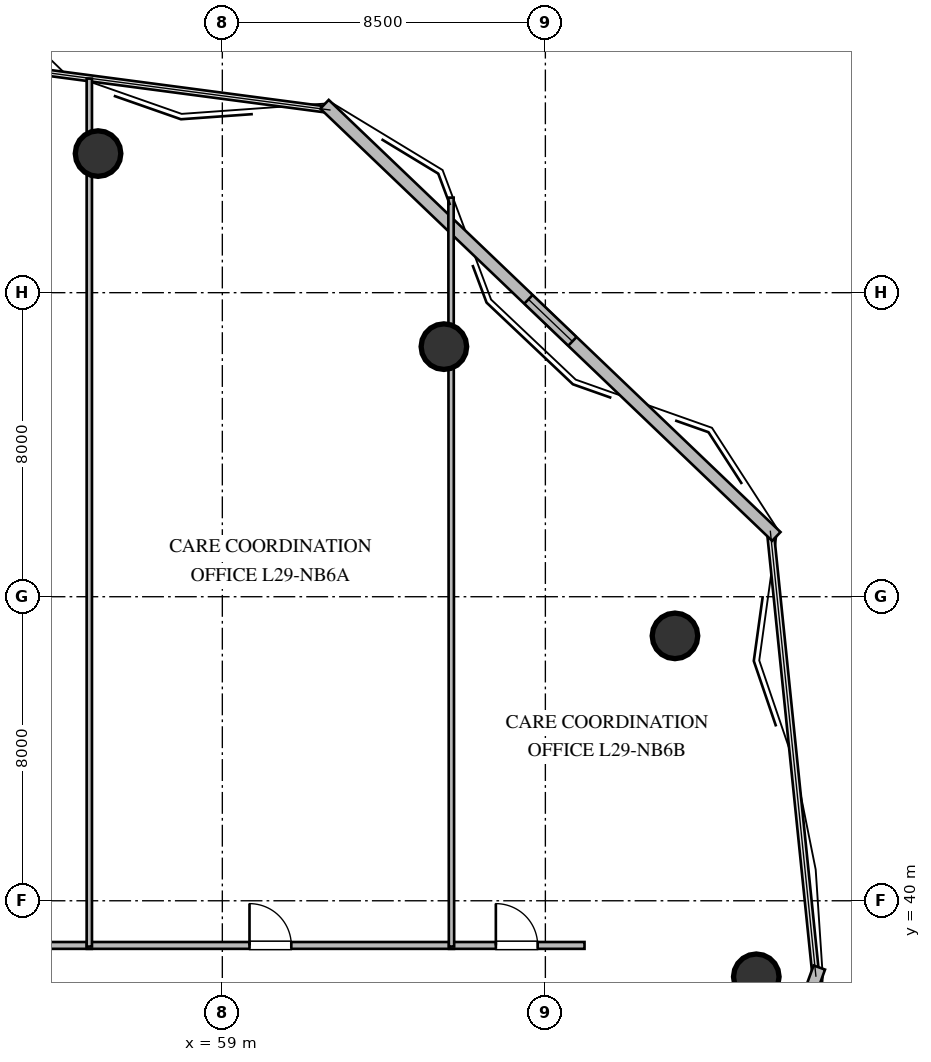
"""IFC4 building model, lengths in metres.
Left out: names, types, materials, properties, quantities, classifications, styles, units other than length and angle.
Written with IfcOpenShell. Run it as: python <this file> out.ifc"""

import sys

from ifc_helpers import new_model, si_unit, direction, frame, frame_2d, origin, origin_2d, place, context, subcontext, project, spatial, rectangle, circle, extrude, element, fill, save


model = new_model("IFC4")
c1 = context("Model", 3, precision=1e-05, world=origin(), true_north=direction((0.0, 1.0)))
c2 = subcontext(c1, "Body", "Model", "MODEL_VIEW")
j1 = project(units=[si_unit("LENGTHUNIT", "METRE"), si_unit("PLANEANGLEUNIT", "RADIAN")], contexts=[c1])
p1 = place(None, origin())
s1 = spatial("IfcSite", under=j1, at=p1, CompositionType="ELEMENT")
p2 = place(p1, origin())
s2 = spatial("IfcBuilding", under=s1, at=p2, CompositionType="ELEMENT")
p3 = place(p2, frame((0.0, 0.0, 113.4)))
s3 = spatial("IfcBuildingStorey", under=s2, at=p3, CompositionType="ELEMENT", Elevation=113.4)
for number, where, z_axis, x_axis in (
    (1, (73.05, 38.0, 0.0), (0.0, 0.0, 1.0), (1.0, 0.0, 0.0)),
    (2, (70.91, 46.97, 0.0), (0.0, 0.0, 1.0), (1.0, 0.0, 0.0)),
    (3, (64.83, 54.58, 0.0), (0.0, 0.0, 1.0), (1.0, 0.0, 0.0)),
    (4, (55.73, 59.66, 0.0), (0.0, 0.0, 1.0), (1.0, 0.0, 0.0)),
):
    element("IfcColumn", number, at=place(p3, frame(where, z_axis=z_axis, x_axis=x_axis)), inside=s3, PredefinedType="COLUMN", context=c2, shape_type="SweptSolid", body=[
        extrude(circle(Radius=0.6, at=origin_2d()), origin(), (0.0, 0.0, 1.0), 3.6),
    ])
p4 = place(p3, frame((74.708, 38.244, 0.0), z_axis=(0.0, 0.0, 1.0), x_axis=(-0.340324669139, -0.94030799187, 0.0)))
e5 = element("IfcWall", 5, at=p4, inside=s3, PredefinedType="STANDARD", context=c2, shape_type="SweptSolid", body=[
    extrude(rectangle(XDim=13.81, YDim=0.32, at=frame_2d((6.905, 0.0))), origin(), (0.0, 0.0, 1.0), 3.36),
])
p5 = place(p3, frame((61.689, 60.957, 0.0), z_axis=(0.0, 0.0, 1.0), x_axis=(0.722641212534, -0.691223319881, 0.0)))
e6 = element("IfcWall", 6, at=p5, inside=s3, PredefinedType="STANDARD", context=c2, shape_type="SweptSolid", body=[
    extrude(rectangle(XDim=16.451, YDim=0.32, at=frame_2d((8.225, 0.0))), origin(), (0.0, 0.0, 1.0), 3.36),
])
p6 = place(p5, frame((7.425, 0.0, 1.05)))
e7 = element("IfcOpeningElement", 7, at=p6, cuts=e6, PredefinedType="OPENING", context=c2, shape_type="SweptSolid", body=[
    extrude(rectangle(XDim=1.6, YDim=1.5, at=frame_2d((0.8, 0.75))), frame((0.0, 0.17, 0.0), z_axis=(0.0, -1.0, 0.0), x_axis=(1.0, 0.0, 0.0)), (0.0, 0.0, 1.0), 0.34),
])
p7 = place(p3, frame((50.935, 38.825, 0.0), z_axis=(0.0, 0.0, 1.0), x_axis=(1.0, 0.0, 0.0)))
e8 = element("IfcWall", 8, at=p7, inside=s3, PredefinedType="PARTITIONING", context=c2, shape_type="SweptSolid", body=[
    extrude(rectangle(XDim=4.63, YDim=0.18, at=frame_2d((2.315, 0.0))), origin(), (0.0, 0.0, 1.0), 3.36),
])
p8 = place(p7, frame((1.765, 0.0, 0.0)))
e9 = element("IfcOpeningElement", 9, at=p8, cuts=e8, PredefinedType="OPENING", context=c2, shape_type="SweptSolid", body=[
    extrude(rectangle(XDim=1.1, YDim=2.1, at=frame_2d((0.55, 1.05))), frame((0.0, 0.1, 0.0), z_axis=(0.0, -1.0, 0.0), x_axis=(1.0, 0.0, 0.0)), (0.0, 0.0, 1.0), 0.2),
])
p9 = place(p3, frame((55.435, 38.825, 0.0), z_axis=(0.0, 0.0, 1.0), x_axis=(1.0, 0.0, 0.0)))
e10 = element("IfcWall", 10, at=p9, inside=s3, PredefinedType="PARTITIONING", context=c2, shape_type="SweptSolid", body=[
    extrude(rectangle(XDim=9.66, YDim=0.18, at=frame_2d((4.83, 0.0))), origin(), (0.0, 0.0, 1.0), 3.36),
])
p10 = place(p9, frame((4.28, 0.0, 0.0)))
e11 = element("IfcOpeningElement", 11, at=p10, cuts=e10, PredefinedType="OPENING", context=c2, shape_type="SweptSolid", body=[
    extrude(rectangle(XDim=1.1, YDim=2.1, at=frame_2d((0.55, 1.05))), frame((0.0, 0.1, 0.0), z_axis=(0.0, -1.0, 0.0), x_axis=(1.0, 0.0, 0.0)), (0.0, 0.0, 1.0), 0.2),
])
p11 = place(p3, frame((64.965, 38.825, 0.0), z_axis=(0.0, 0.0, 1.0), x_axis=(1.0, 0.0, 0.0)))
e12 = element("IfcWall", 12, at=p11, inside=s3, PredefinedType="PARTITIONING", context=c2, shape_type="SweptSolid", body=[
    extrude(rectangle(XDim=3.565, YDim=0.18, at=frame_2d((1.782, 0.0))), origin(), (0.0, 0.0, 1.0), 3.36),
])
p12 = place(p11, frame((1.232, 0.0, 0.0)))
e13 = element("IfcOpeningElement", 13, at=p12, cuts=e12, PredefinedType="OPENING", context=c2, shape_type="SweptSolid", body=[
    extrude(rectangle(XDim=1.1, YDim=2.1, at=frame_2d((0.55, 1.05))), frame((0.0, 0.1, 0.0), z_axis=(0.0, -1.0, 0.0), x_axis=(1.0, 0.0, 0.0)), (0.0, 0.0, 1.0), 0.2),
])
p13 = place(p3, frame((55.5, 61.633, 0.0), z_axis=(0.0, 0.0, 1.0), x_axis=(0.0, -1.0, 0.0)))
e14 = element("IfcWall", 14, at=p13, inside=s3, PredefinedType="PARTITIONING", context=c2, shape_type="SweptSolid", body=[
    extrude(rectangle(XDim=22.838, YDim=0.14, at=frame_2d((11.419, 0.0))), origin(), (0.0, 0.0, 1.0), 3.36),
])
p14 = place(p3, frame((65.017, 58.501, 0.0), z_axis=(0.0, 0.0, 1.0), x_axis=(0.000656623081, -0.999999784423, 0.0)))
e15 = element("IfcWall", 15, at=p14, inside=s3, PredefinedType="PARTITIONING", context=c2, shape_type="SweptSolid", body=[
    extrude(rectangle(XDim=19.706, YDim=0.14, at=frame_2d((9.853, 0.0))), origin(), (0.0, 0.0, 1.0), 3.36),
])
p15 = place(p6, origin())
e16 = element("IfcWindow", 16, at=p15, inside=s3, PartitioningType="SINGLE_PANEL", PredefinedType="WINDOW", context=c2, shape_type="SweptSolid", body=[
    extrude(rectangle(XDim=1.6, YDim=1.5, at=frame_2d((0.8, 0.75))), frame((0.0, 0.03, 0.0), z_axis=(0.0, -1.0, 0.0), x_axis=(1.0, 0.0, 0.0)), (0.0, 0.0, 1.0), 0.06),
])
fill(e7, e16)
p16 = place(p10, origin())
e17 = element("IfcDoor", 17, at=p16, inside=s3, OperationType="SINGLE_SWING_LEFT", PredefinedType="DOOR", context=c2, shape_type="SweptSolid", body=[
    extrude(rectangle(XDim=1.1, YDim=2.1, at=frame_2d((0.55, 1.05))), frame((0.0, 0.025, 0.0), z_axis=(0.0, -1.0, 0.0), x_axis=(1.0, 0.0, 0.0)), (0.0, 0.0, 1.0), 0.05),
])
fill(e11, e17)
p17 = place(p12, origin())
e18 = element("IfcDoor", 18, at=p17, inside=s3, OperationType="SINGLE_SWING_LEFT", PredefinedType="DOOR", context=c2, shape_type="SweptSolid", body=[
    extrude(rectangle(XDim=1.1, YDim=2.1, at=frame_2d((0.55, 1.05))), frame((0.0, 0.025, 0.0), z_axis=(0.0, -1.0, 0.0), x_axis=(1.0, 0.0, 0.0)), (0.0, 0.0, 1.0), 0.05),
])
fill(e13, e18)
save(model, sys.argv[1])
